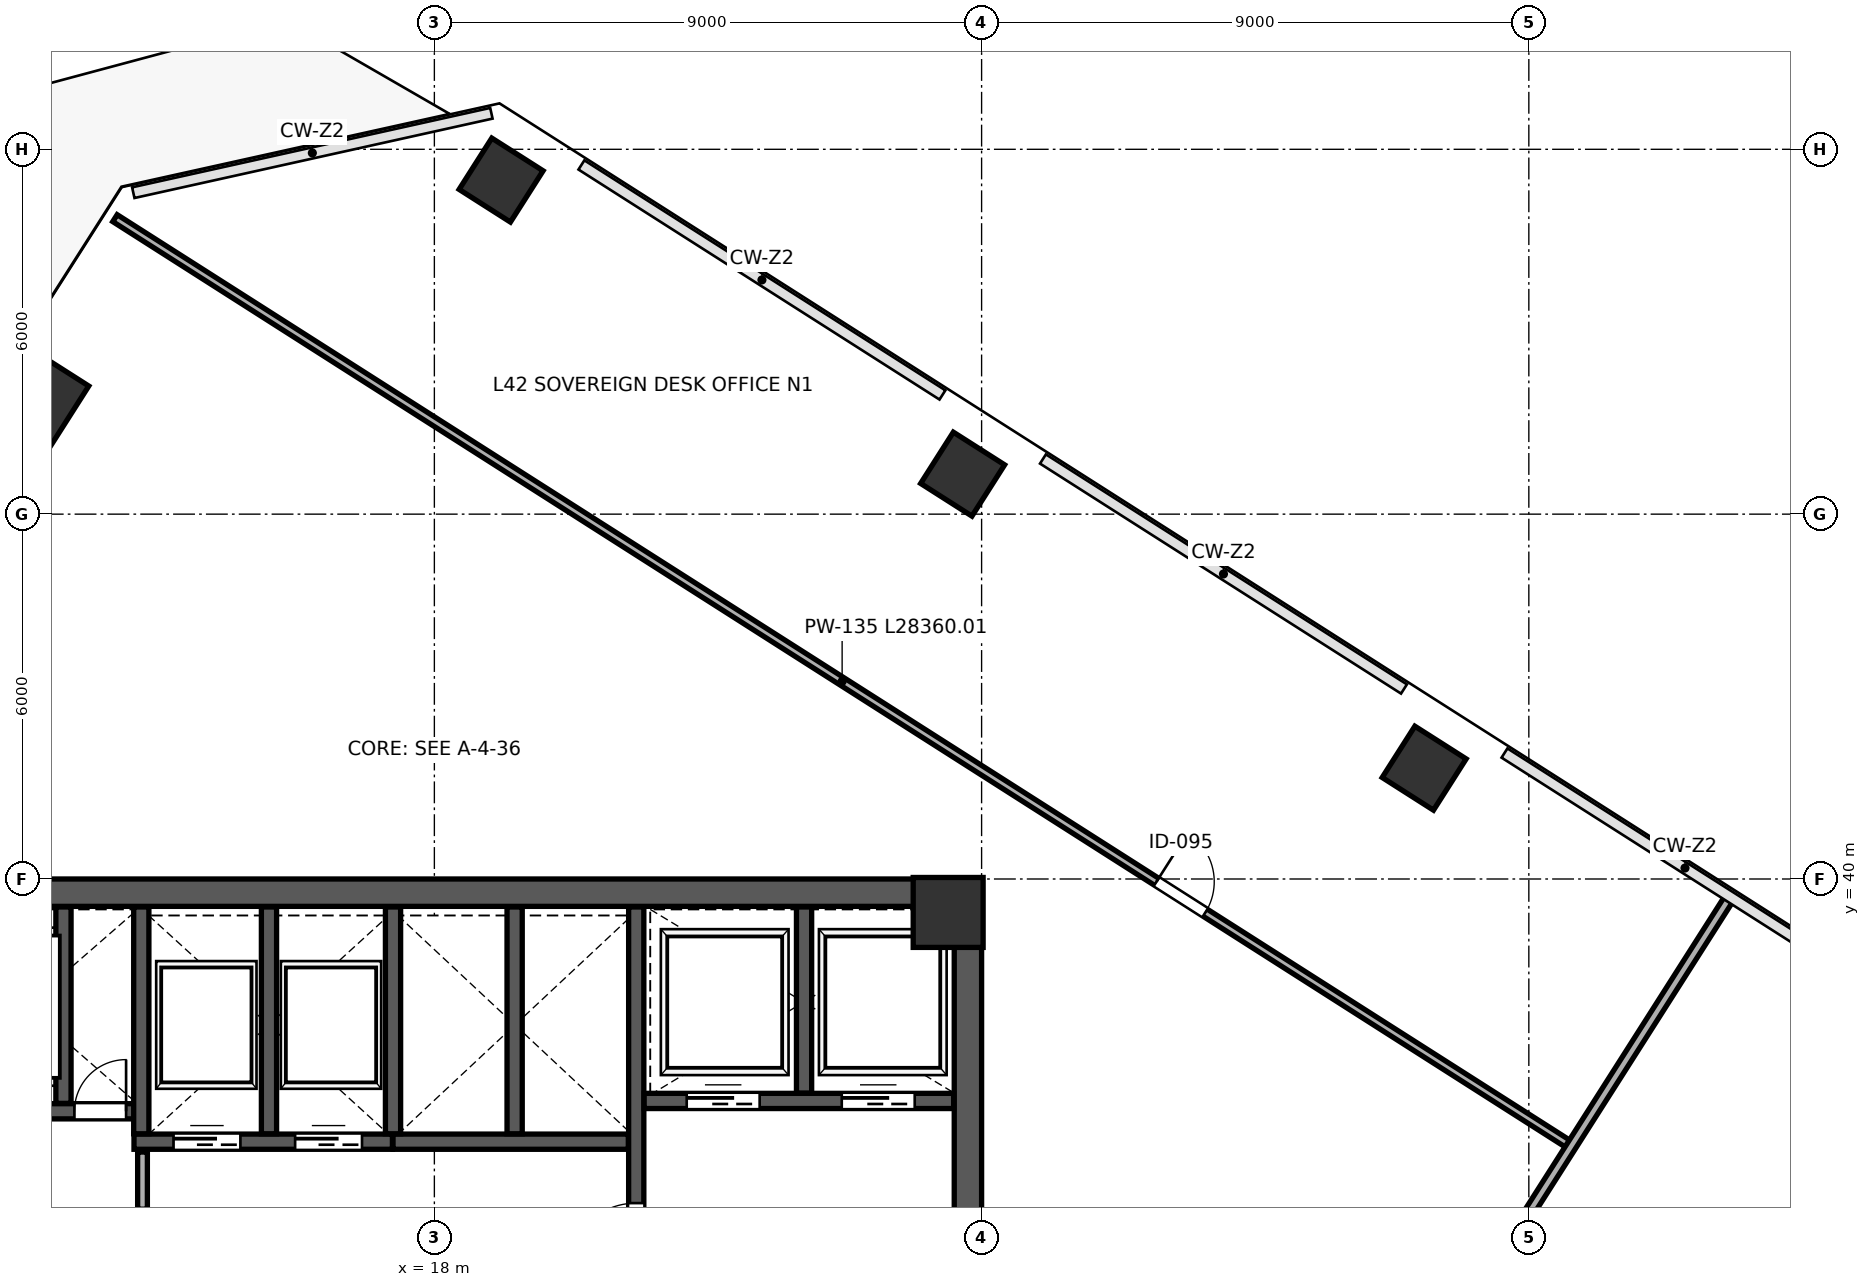
"""IFC4 building model, lengths in metres.
Left out: names, types, materials, properties, quantities, classifications, styles, units other than length and angle.
Written with IfcOpenShell. Run it as: python <this file> out.ifc"""

import sys

from ifc_helpers import new_model, si_unit, direction, frame, frame_2d, origin, origin_2d, place, context, subcontext, project, spatial, rectangle, extrude, source, transform, mapped, element, fill, save


model = new_model("IFC4")
c1 = context("Model", 3, precision=1e-05, world=origin(), true_north=direction((0.0, 1.0)))
c2 = subcontext(c1, "Body", "Model", "MODEL_VIEW")
j1 = project(units=[si_unit("LENGTHUNIT", "METRE"), si_unit("PLANEANGLEUNIT", "RADIAN")], contexts=[c1])
p1 = place(None, origin())
s1 = spatial("IfcSite", under=j1, at=p1, CompositionType="ELEMENT")
p2 = place(p1, origin())
s2 = spatial("IfcBuilding", under=s1, at=p2, CompositionType="ELEMENT")
p3 = place(p2, frame((0.0, 0.0, 187.6)))
s3 = spatial("IfcBuildingStorey", under=s2, at=p3, CompositionType="ELEMENT", Elevation=187.6)
m1 = source(origin(), c2, "Body", "SweptSolid", [
    extrude(rectangle(XDim=1.15, YDim=1.15, at=origin_2d()), origin(), (0.0, 0.0, 1.0), 4.198),
])
p4 = place(p3, frame((26.45, 39.45, 0.001), z_axis=(0.0, 0.0, 1.0), x_axis=(1.0, 0.0, 0.0)))
e1 = element("IfcColumn", 1, at=p4, inside=s3, PredefinedType="COLUMN", context=c2, shape_type="MappedRepresentation", body=[
    mapped(m1, transform((0.0, 0.0, 0.0), scale=1.0)),
])
m2 = source(origin(), c2, "Body", "SweptSolid", [
    extrude(rectangle(XDim=1.0, YDim=1.0, at=origin_2d()), origin(), (0.0, 0.0, 1.0), 4.198),
])
for number, where, z_axis, x_axis in (
    (2, (19.098, 51.494, 0.001), (0.0, 0.0, 1.0), (-0.843, 0.537, 0.0)),
    (3, (26.688, 46.658, 0.001), (0.0, 0.0, 1.0), (-0.843, 0.537, 0.0)),
    (4, (34.279, 41.822, 0.001), (0.0, 0.0, 1.0), (-0.843, 0.537, 0.0)),
):
    element("IfcColumn", number, at=place(p3, frame(where, z_axis=z_axis, x_axis=x_axis)), inside=s3, PredefinedType="COLUMN", context=c2, shape_type="MappedRepresentation", body=[
        mapped(m2, transform((0.0, 0.0, 0.0), scale=1.0)),
    ])
m3 = source(origin(), c2, "Body", "SweptSolid", [
    extrude(rectangle(XDim=0.9, YDim=1.3, at=origin_2d()), origin(), (0.0, 0.0, 1.0), 4.198),
])
p5 = place(p3, frame((11.587, 47.801, 0.001), z_axis=(0.0, 0.0, 1.0), x_axis=(-0.843391445813, 0.537299608347, 0.0)))
e5 = element("IfcColumn", 5, at=p5, inside=s3, PredefinedType="PILASTER", context=c2, shape_type="MappedRepresentation", body=[
    mapped(m3, transform((0.0, 0.0, 0.0), scale=1.0)),
])
p6 = place(p3, frame((26.775, 24.45, 0.0), z_axis=(0.0, 0.0, 1.0), x_axis=(0.0, 1.0, 0.0)))
e6 = element("IfcWall", 6, at=p6, inside=s3, PredefinedType="SHEAR", context=c2, shape_type="SweptSolid", body=[
    extrude(rectangle(XDim=15.1, YDim=0.45, at=frame_2d((7.55, 0.0))), origin(), (0.0, 0.0, 1.0), 3.96),
])
p7 = place(p6, frame((8.6, 0.0, 0.0)))
e7 = element("IfcOpeningElement", 7, at=p7, cuts=e6, PredefinedType="OPENING", context=c2, shape_type="SweptSolid", body=[
    extrude(rectangle(XDim=1.15, YDim=2.2, at=frame_2d((0.575, 1.1))), frame((0.0, 0.235, 0.0), z_axis=(0.0, -1.0, 0.0), x_axis=(1.0, 0.0, 0.0)), (0.0, 0.0, 1.0), 0.47),
])
p8 = place(p3, frame((9.0, 39.775, 0.0), z_axis=(0.0, 0.0, 1.0), x_axis=(1.0, 0.0, 0.0)))
e8 = element("IfcWall", 8, at=p8, inside=s3, PredefinedType="SHEAR", context=c2, shape_type="SweptSolid", body=[
    extrude(rectangle(XDim=18.0, YDim=0.45, at=frame_2d((9.0, 0.0))), origin(), (0.0, 0.0, 1.0), 3.96),
])
p9 = place(p3, frame((21.32, 32.12, 0.0), z_axis=(0.0, 0.0, 1.0), x_axis=(0.0, 1.0, 0.0)))
e9 = element("IfcWall", 9, at=p9, inside=s3, PredefinedType="SHEAR", context=c2, shape_type="SweptSolid", body=[
    extrude(rectangle(XDim=7.42, YDim=0.25, at=frame_2d((3.71, 0.0))), origin(), (0.0, 0.0, 1.0), 3.96),
])
p10 = place(p9, frame((1.4, 0.0, 0.0)))
e10 = element("IfcOpeningElement", 10, at=p10, cuts=e9, PredefinedType="OPENING", context=c2, shape_type="SweptSolid", body=[
    extrude(rectangle(XDim=1.15, YDim=2.2, at=frame_2d((0.575, 1.1))), frame((0.0, 0.135, 0.0), z_axis=(0.0, -1.0, 0.0), x_axis=(1.0, 0.0, 0.0)), (0.0, 0.0, 1.0), 0.27),
])
p11 = place(p3, frame((9.46, 36.18, 0.0), z_axis=(0.0, 0.0, 1.0), x_axis=(1.0, 0.0, 0.0)))
e11 = element("IfcWall", 11, at=p11, inside=s3, PredefinedType="SHEAR", context=c2, shape_type="SweptSolid", body=[
    extrude(rectangle(XDim=3.79, YDim=0.25, at=frame_2d((1.895, 0.0))), origin(), (0.0, 0.0, 1.0), 3.96),
])
p12 = place(p11, frame((2.62, 0.0, 0.0)))
e12 = element("IfcOpeningElement", 12, at=p12, cuts=e11, PredefinedType="OPENING", context=c2, shape_type="SweptSolid", body=[
    extrude(rectangle(XDim=0.85, YDim=2.1, at=frame_2d((0.425, 1.05))), frame((0.0, 0.135, 0.0), z_axis=(0.0, -1.0, 0.0), x_axis=(1.0, 0.0, 0.0)), (0.0, 0.0, 1.0), 0.27),
])
p13 = place(p11, frame((0.85, 0.0, 0.0)))
e13 = element("IfcOpeningElement", 13, at=p13, cuts=e11, PredefinedType="OPENING", context=c2, shape_type="SweptSolid", body=[
    extrude(rectangle(XDim=1.3, YDim=2.25, at=frame_2d((0.65, 1.125))), frame((0.0, 0.135, 0.0), z_axis=(0.0, -1.0, 0.0), x_axis=(1.0, 0.0, 0.0)), (0.0, 0.0, 1.0), 0.27),
])
p14 = place(p3, frame((11.9, 36.31, 0.0), z_axis=(0.0, 0.0, 1.0), x_axis=(0.0, 1.0, 0.0)))
e14 = element("IfcWall", 14, at=p14, inside=s3, PredefinedType="SHEAR", context=c2, shape_type="SweptSolid", body=[
    extrude(rectangle(XDim=3.23, YDim=0.25, at=frame_2d((1.615, 0.0))), origin(), (0.0, 0.0, 1.0), 3.96),
])
p15 = place(p3, frame((21.45, 36.35, 0.0), z_axis=(0.0, 0.0, 1.0), x_axis=(1.0, 0.0, 0.0)))
e15 = element("IfcWall", 15, at=p15, inside=s3, PredefinedType="SHEAR", context=c2, shape_type="SweptSolid", body=[
    extrude(rectangle(XDim=5.09, YDim=0.25, at=frame_2d((2.545, 0.0))), origin(), (0.0, 0.0, 1.0), 3.96),
])
p16 = place(p15, frame((0.7, 0.0, 0.0)))
e16 = element("IfcOpeningElement", 16, at=p16, cuts=e15, PredefinedType="OPENING", context=c2, shape_type="SweptSolid", body=[
    extrude(rectangle(XDim=1.2, YDim=2.2, at=frame_2d((0.6, 1.1))), frame((0.0, 0.135, 0.0), z_axis=(0.0, -1.0, 0.0), x_axis=(1.0, 0.0, 0.0)), (0.0, 0.0, 1.0), 0.27),
])
p17 = place(p15, frame((3.25, 0.0, 0.0)))
e17 = element("IfcOpeningElement", 17, at=p17, cuts=e15, PredefinedType="OPENING", context=c2, shape_type="SweptSolid", body=[
    extrude(rectangle(XDim=1.2, YDim=2.2, at=frame_2d((0.6, 1.1))), frame((0.0, 0.135, 0.0), z_axis=(0.0, -1.0, 0.0), x_axis=(1.0, 0.0, 0.0)), (0.0, 0.0, 1.0), 0.27),
])
p18 = place(p3, frame((24.08, 36.48, 0.0), z_axis=(0.0, 0.0, 1.0), x_axis=(0.0, 1.0, 0.0)))
e18 = element("IfcWall", 18, at=p18, inside=s3, PredefinedType="SHEAR", context=c2, shape_type="SweptSolid", body=[
    extrude(rectangle(XDim=3.06, YDim=0.25, at=frame_2d((1.53, 0.0))), origin(), (0.0, 0.0, 1.0), 3.96),
])
p19 = place(p3, frame((13.06, 35.68, 0.0), z_axis=(0.0, 0.0, 1.0), x_axis=(1.0, 0.0, 0.0)))
e19 = element("IfcWall", 19, at=p19, inside=s3, PredefinedType="SHEAR", context=c2, shape_type="SweptSolid", body=[
    extrude(rectangle(XDim=4.25, YDim=0.25, at=frame_2d((2.125, 0.0))), origin(), (0.0, 0.0, 1.0), 3.96),
])
p20 = place(p19, frame((0.65, 0.0, 0.0)))
e20 = element("IfcOpeningElement", 20, at=p20, cuts=e19, PredefinedType="OPENING", context=c2, shape_type="SweptSolid", body=[
    extrude(rectangle(XDim=1.1, YDim=2.2, at=frame_2d((0.55, 1.1))), frame((0.0, 0.135, 0.0), z_axis=(0.0, -1.0, 0.0), x_axis=(1.0, 0.0, 0.0)), (0.0, 0.0, 1.0), 0.27),
])
p21 = place(p19, frame((2.65, 0.0, 0.0)))
e21 = element("IfcOpeningElement", 21, at=p21, cuts=e19, PredefinedType="OPENING", context=c2, shape_type="SweptSolid", body=[
    extrude(rectangle(XDim=1.1, YDim=2.2, at=frame_2d((0.55, 1.1))), frame((0.0, 0.135, 0.0), z_axis=(0.0, -1.0, 0.0), x_axis=(1.0, 0.0, 0.0)), (0.0, 0.0, 1.0), 0.27),
])
for number, where, z_axis, x_axis in (
    (22, (13.18, 35.81, 0.0), (0.0, 0.0, 1.0), (0.0, 1.0, 0.0)),
    (23, (15.28, 35.81, 0.0), (0.0, 0.0, 1.0), (0.0, 1.0, 0.0)),
):
    element("IfcWall", number, at=place(p3, frame(where, z_axis=z_axis, x_axis=x_axis)), inside=s3, PredefinedType="SHEAR", context=c2, shape_type="SweptSolid", body=[
        extrude(rectangle(XDim=3.73, YDim=0.25, at=frame_2d((1.865, 0.0))), origin(), (0.0, 0.0, 1.0), 3.96),
    ])
p22 = place(p3, frame((17.32, 35.68, 0.0), z_axis=(0.0, 0.0, 1.0), x_axis=(1.0, 0.0, 0.0)))
e24 = element("IfcWall", 24, at=p22, inside=s3, PredefinedType="SHEAR", context=c2, shape_type="SweptSolid", body=[
    extrude(rectangle(XDim=3.87, YDim=0.25, at=frame_2d((1.935, 0.0))), origin(), (0.0, 0.0, 1.0), 3.96),
])
for number, where, z_axis, x_axis in (
    (25, (17.32, 35.81, 0.0), (0.0, 0.0, 1.0), (0.0, 1.0, 0.0)),
    (26, (19.32, 35.81, 0.0), (0.0, 0.0, 1.0), (0.0, 1.0, 0.0)),
):
    element("IfcWall", number, at=place(p3, frame(where, z_axis=z_axis, x_axis=x_axis)), inside=s3, PredefinedType="SHEAR", context=c2, shape_type="SweptSolid", body=[
        extrude(rectangle(XDim=3.73, YDim=0.25, at=frame_2d((1.865, 0.0))), origin(), (0.0, 0.0, 1.0), 3.96),
    ])
p23 = place(p3, frame((13.2, 34.57, 0.0), z_axis=(0.0, 0.0, 1.0), x_axis=(0.0, 1.0, 0.0)))
e27 = element("IfcWall", 27, at=p23, inside=s3, PredefinedType="PARTITIONING", context=c2, shape_type="SweptSolid", body=[
    extrude(rectangle(XDim=0.94, YDim=0.16, at=frame_2d((0.47, 0.0))), origin(), (0.0, 0.0, 1.0), 3.96),
])
p24 = place(p3, frame((12.747, 50.868, 0.0), z_axis=(0.0, 0.0, 1.0), x_axis=(0.843393047262, -0.537297094567, 0.0)))
e28 = element("IfcWall", 28, at=p24, inside=s3, PredefinedType="PARTITIONING", context=c2, shape_type="SweptSolid", body=[
    extrude(rectangle(XDim=28.36, YDim=0.135, at=frame_2d((14.18, 0.0))), origin(), (0.0, 0.0, 1.0), 3.96),
])
p25 = place(p24, frame((20.31, 0.0, 0.0)))
e29 = element("IfcOpeningElement", 29, at=p25, cuts=e28, PredefinedType="OPENING", context=c2, shape_type="SweptSolid", body=[
    extrude(rectangle(XDim=0.95, YDim=2.15, at=frame_2d((0.475, 1.075))), frame((0.0, 0.078, 0.0), z_axis=(0.0, -1.0, 0.0), x_axis=(1.0, 0.0, 0.0)), (0.0, 0.0, 1.0), 0.155),
])
p26 = place(p3, frame((29.698, 24.619, 0.0), z_axis=(0.0, 0.0, 1.0), x_axis=(0.537299578138, 0.843391465058, 0.0)))
e30 = element("IfcWall", 30, at=p26, inside=s3, PredefinedType="PARTITIONING", context=c2, shape_type="SweptSolid", body=[
    extrude(rectangle(XDim=17.84, YDim=0.16, at=frame_2d((8.92, 0.0))), origin(), (0.0, 0.0, 1.0), 3.195),
])
m4 = source(origin(), c2, "Body", "SweptSolid", [
    extrude(rectangle(XDim=1.15, YDim=2.2, at=frame_2d((0.575, 1.1))), frame((0.0, 0.025, 0.0), z_axis=(0.0, -1.0, 0.0), x_axis=(1.0, 0.0, 0.0)), (0.0, 0.0, 1.0), 0.05),
])
p27 = place(p10, origin())
e31 = element("IfcDoor", 31, at=p27, inside=s3, OperationType="SINGLE_SWING_LEFT", PredefinedType="DOOR", context=c2, shape_type="MappedRepresentation", body=[
    mapped(m4, transform((0.0, 0.0, 0.0), scale=1.0)),
])
fill(e10, e31)
m5 = source(origin(), c2, "Body", "SweptSolid", [
    extrude(rectangle(XDim=0.85, YDim=2.1, at=frame_2d((0.425, 1.05))), frame((0.0, 0.025, 0.0), z_axis=(0.0, -1.0, 0.0), x_axis=(1.0, 0.0, 0.0)), (0.0, 0.0, 1.0), 0.05),
])
p28 = place(p12, origin())
e32 = element("IfcDoor", 32, at=p28, inside=s3, OperationType="SINGLE_SWING_RIGHT", PredefinedType="DOOR", context=c2, shape_type="MappedRepresentation", body=[
    mapped(m5, transform((0.0, 0.0, 0.0), scale=1.0)),
])
fill(e12, e32)
m6 = source(origin(), c2, "Body", "SweptSolid", [
    extrude(rectangle(XDim=1.1, YDim=2.2, at=frame_2d((0.55, 1.1))), frame((0.0, 0.025, 0.0), z_axis=(0.0, -1.0, 0.0), x_axis=(1.0, 0.0, 0.0)), (0.0, 0.0, 1.0), 0.05),
])
p29 = place(p20, origin())
e33 = element("IfcDoor", 33, at=p29, inside=s3, OperationType="SLIDING_TO_LEFT", PredefinedType="DOOR", context=c2, shape_type="MappedRepresentation", body=[
    mapped(m6, transform((0.0, 0.0, 0.0), scale=1.0)),
])
fill(e20, e33)
p30 = place(p21, origin())
e34 = element("IfcDoor", 34, at=p30, inside=s3, OperationType="SLIDING_TO_RIGHT", PredefinedType="DOOR", context=c2, shape_type="MappedRepresentation", body=[
    mapped(m6, transform((0.0, 0.0, 0.0), scale=1.0)),
])
fill(e21, e34)
m7 = source(origin(), c2, "Body", "SweptSolid", [
    extrude(rectangle(XDim=1.2, YDim=2.2, at=frame_2d((0.6, 1.1))), frame((0.0, 0.025, 0.0), z_axis=(0.0, -1.0, 0.0), x_axis=(1.0, 0.0, 0.0)), (0.0, 0.0, 1.0), 0.05),
])
p31 = place(p16, origin())
e35 = element("IfcDoor", 35, at=p31, inside=s3, OperationType="SLIDING_TO_LEFT", PredefinedType="DOOR", context=c2, shape_type="MappedRepresentation", body=[
    mapped(m7, transform((0.0, 0.0, 0.0), scale=1.0)),
])
fill(e16, e35)
p32 = place(p17, origin())
e36 = element("IfcDoor", 36, at=p32, inside=s3, OperationType="SLIDING_TO_RIGHT", PredefinedType="DOOR", context=c2, shape_type="MappedRepresentation", body=[
    mapped(m7, transform((0.0, 0.0, 0.0), scale=1.0)),
])
fill(e17, e36)
m8 = source(origin(), c2, "Body", "SweptSolid", [
    extrude(rectangle(XDim=0.95, YDim=2.15, at=frame_2d((0.475, 1.075))), frame((0.0, 0.025, 0.0), z_axis=(0.0, -1.0, 0.0), x_axis=(1.0, 0.0, 0.0)), (0.0, 0.0, 1.0), 0.05),
])
p33 = place(p25, origin())
e37 = element("IfcDoor", 37, at=p33, inside=s3, OperationType="SINGLE_SWING_LEFT", PredefinedType="DOOR", context=c2, shape_type="MappedRepresentation", body=[
    mapped(m8, transform((0.0, 0.0, 0.0), scale=1.0)),
])
fill(e29, e37)
save(model, sys.argv[1])
